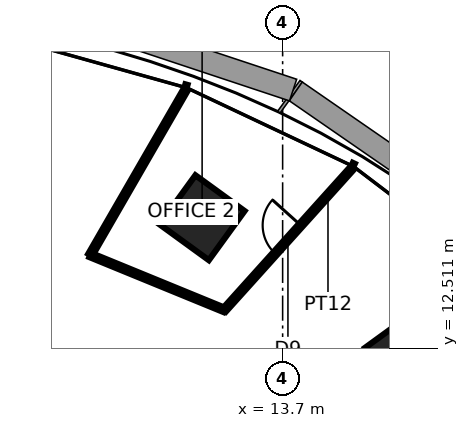
"""IFC4 building model, lengths in metres.
Left out: names, types, materials, properties, quantities, classifications, styles, units other than length and angle.
Written with IfcOpenShell. Run it as: python <this file> out.ifc"""

import sys

from ifc_helpers import new_model, si_unit, direction, frame, frame_2d, origin, origin_2d, place, context, subcontext, project, spatial, rectangle, extrude, element, fill, save


model = new_model("IFC4")
c1 = context("Model", 3, precision=1e-05, world=origin(), true_north=direction((0.0, 1.0)))
c2 = subcontext(c1, "Body", "Model", "MODEL_VIEW")
j1 = project(units=[si_unit("LENGTHUNIT", "METRE"), si_unit("PLANEANGLEUNIT", "RADIAN")], contexts=[c1])
p1 = place(None, origin())
s1 = spatial("IfcSite", under=j1, at=p1, CompositionType="ELEMENT")
p2 = place(p1, origin())
s2 = spatial("IfcBuilding", under=s1, at=p2, CompositionType="ELEMENT")
p3 = place(p2, frame((0.0, 0.0, 127.5)))
s3 = spatial("IfcBuildingStorey", under=s2, at=p3, CompositionType="ELEMENT", Elevation=127.5)
for number, where, z_axis, x_axis in (
    (1, (16.986, 12.341, 0.0), (0.0, 0.0, 1.0), (0.809, 0.588, 0.0)),
    (2, (11.581, 15.94, 0.0), (0.0, 0.0, 1.0), (0.588, 0.809, 0.0)),
):
    element("IfcColumn", number, at=place(p3, frame(where, z_axis=z_axis, x_axis=x_axis)), inside=s3, PredefinedType="COLUMN", context=c2, shape_type="SweptSolid", body=[
        extrude(rectangle(XDim=1.6, YDim=1.6, at=origin_2d()), origin(), (0.0, 0.0, 1.0), 3.9),
    ])
p4 = place(p3, frame((12.167, 13.512, 0.0), z_axis=(0.0, 0.0, 1.0), x_axis=(0.669126573551, 0.743148456614, 0.0)))
e3 = element("IfcWall", 3, at=p4, inside=s3, PredefinedType="PARTITIONING", context=c2, shape_type="SweptSolid", body=[
    extrude(rectangle(XDim=5.0, YDim=0.12, at=frame_2d((2.5, 0.0))), origin(), (0.0, 0.0, 1.0), 3.74),
])
p5 = place(p4, frame((2.0, 0.0, 0.0)))
e4 = element("IfcOpeningElement", 4, at=p5, cuts=e3, PredefinedType="OPENING", context=c2, shape_type="SweptSolid", body=[
    extrude(rectangle(XDim=1.0, YDim=2.4, at=frame_2d((0.5, 1.2))), frame((0.0, 0.07, 0.0), z_axis=(0.0, -1.0, 0.0), x_axis=(1.0, 0.0, 0.0)), (0.0, 0.0, 1.0), 0.14),
])
p6 = place(p3, frame((8.637, 14.959, 0.0), z_axis=(0.0, 0.0, 1.0), x_axis=(0.925323544258, -0.379178504719, 0.0)))
e5 = element("IfcWall", 5, at=p6, inside=s3, PredefinedType="PARTITIONING", context=c2, shape_type="SweptSolid", body=[
    extrude(rectangle(XDim=3.815, YDim=0.12, at=frame_2d((1.907, 0.0))), origin(), (0.0, 0.0, 1.0), 3.74),
])
p7 = place(p3, frame((11.137, 19.289, 0.0), z_axis=(0.0, 0.0, 1.0), x_axis=(-0.499983091616, -0.866035165624, 0.0)))
e6 = element("IfcWall", 6, at=p7, inside=s3, PredefinedType="PARTITIONING", context=c2, shape_type="SweptSolid", body=[
    extrude(rectangle(XDim=5.0, YDim=0.12, at=frame_2d((2.5, 0.0))), origin(), (0.0, 0.0, 1.0), 3.74),
])
p8 = place(p5, origin())
e7 = element("IfcDoor", 7, at=p8, inside=s3, OperationType="SINGLE_SWING_RIGHT", PredefinedType="DOOR", context=c2, shape_type="SweptSolid", body=[
    extrude(rectangle(XDim=1.0, YDim=2.4, at=frame_2d((0.5, 1.2))), frame((0.0, 0.025, 0.0), z_axis=(0.0, -1.0, 0.0), x_axis=(1.0, 0.0, 0.0)), (0.0, 0.0, 1.0), 0.05),
])
fill(e4, e7)
save(model, sys.argv[1])
